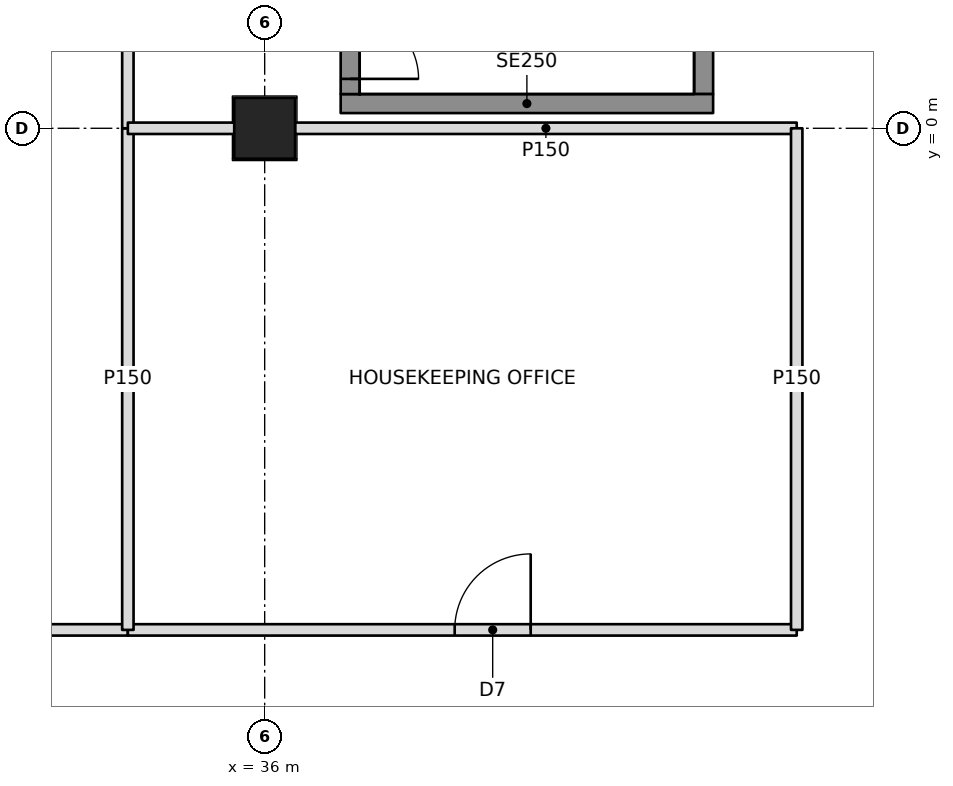
"""IFC4 building model, lengths in metres.
Left out: names, types, materials, properties, quantities, classifications, styles, units other than length and angle.
Written with IfcOpenShell. Run it as: python <this file> out.ifc"""

import sys

from ifc_helpers import new_model, si_unit, direction, frame, frame_2d, origin, origin_2d, place, context, subcontext, project, spatial, rectangle, hollow_rectangle, extrude, element, fill, save


model = new_model("IFC4")
c1 = context("Model", 3, precision=1e-05, world=origin(), true_north=direction((0.0, 1.0)))
c2 = subcontext(c1, "Body", "Model", "MODEL_VIEW")
j1 = project(units=[si_unit("LENGTHUNIT", "METRE"), si_unit("PLANEANGLEUNIT", "RADIAN")], contexts=[c1])
p1 = place(None, origin())
s1 = spatial("IfcSite", under=j1, at=p1, CompositionType="ELEMENT")
p2 = place(p1, origin())
s2 = spatial("IfcBuilding", under=s1, at=p2, CompositionType="ELEMENT")
p3 = place(p2, frame((0.0, 0.0, -10.5)))
s3 = spatial("IfcBuildingStorey", under=s2, at=p3, CompositionType="ELEMENT", Elevation=-10.5)
p4 = place(p3, frame((36.0, 0.0, -0.5), z_axis=(0.0, 0.0, 1.0), x_axis=(1.0, 0.0, 0.0)))
e1 = element("IfcColumn", 1, at=p4, inside=s3, PredefinedType="COLUMN", context=c2, shape_type="SweptSolid", body=[
    extrude(hollow_rectangle(XDim=0.8, YDim=0.8, WallThickness=0.1, at=origin_2d()), origin(), (0.0, 0.0, 1.0), 5.5),
])
p5 = place(p3, frame((34.2, -6.6, 0.0), z_axis=(0.0, 0.0, 1.0), x_axis=(-1.0, 0.0, 0.0)))
e2 = element("IfcWall", 2, at=p5, inside=s3, PredefinedType="PARTITIONING", context=c2, shape_type="SweptSolid", body=[
    extrude(rectangle(XDim=8.2, YDim=0.15, at=frame_2d((4.1, 0.0))), origin(), (0.0, 0.0, 1.0), 3.841),
])
p6 = place(p3, frame((43.0, -6.6, 0.0), z_axis=(0.0, 0.0, 1.0), x_axis=(-1.0, 0.0, 0.0)))
e3 = element("IfcWall", 3, at=p6, inside=s3, PredefinedType="PARTITIONING", context=c2, shape_type="SweptSolid", body=[
    extrude(rectangle(XDim=8.8, YDim=0.15, at=frame_2d((4.4, 0.0))), origin(), (0.0, 0.0, 1.0), 3.841),
])
p7 = place(p6, frame((3.5, 0.0, 0.0)))
e4 = element("IfcOpeningElement", 4, at=p7, cuts=e3, PredefinedType="OPENING", context=c2, shape_type="SweptSolid", body=[
    extrude(rectangle(XDim=1.0, YDim=2.1, at=frame_2d((0.5, 1.05))), frame((0.0, 0.085, 0.0), z_axis=(0.0, -1.0, 0.0), x_axis=(1.0, 0.0, 0.0)), (0.0, 0.0, 1.0), 0.17),
])
p8 = place(p3, frame((34.2, 0.0, 0.0), z_axis=(0.0, 0.0, 1.0), x_axis=(0.0, -1.0, 0.0)))
e5 = element("IfcWall", 5, at=p8, inside=s3, PredefinedType="PARTITIONING", context=c2, shape_type="SweptSolid", body=[
    extrude(rectangle(XDim=6.6, YDim=0.15, at=frame_2d((3.3, 0.0))), origin(), (0.0, 0.0, 1.0), 3.841),
])
p9 = place(p3, frame((34.2, 8.8, 0.0), z_axis=(0.0, 0.0, 1.0), x_axis=(0.0, -1.0, 0.0)))
e6 = element("IfcWall", 6, at=p9, inside=s3, PredefinedType="PARTITIONING", context=c2, shape_type="SweptSolid", body=[
    extrude(rectangle(XDim=8.8, YDim=0.15, at=frame_2d((4.4, 0.0))), origin(), (0.0, 0.0, 1.0), 3.841),
])
p10 = place(p9, frame((4.0, 0.0, 0.0)))
e7 = element("IfcOpeningElement", 7, at=p10, cuts=e6, PredefinedType="OPENING", context=c2, shape_type="SweptSolid", body=[
    extrude(rectangle(XDim=1.0, YDim=2.1, at=frame_2d((0.5, 1.05))), frame((0.0, 0.085, 0.0), z_axis=(0.0, -1.0, 0.0), x_axis=(1.0, 0.0, 0.0)), (0.0, 0.0, 1.0), 0.17),
])
p11 = place(p3, frame((34.2, 0.0, 0.0), z_axis=(0.0, 0.0, 1.0), x_axis=(1.0, 0.0, 0.0)))
e8 = element("IfcWall", 8, at=p11, inside=s3, PredefinedType="PARTITIONING", context=c2, shape_type="SweptSolid", body=[
    extrude(rectangle(XDim=1.4, YDim=0.15, at=frame_2d((0.7, 0.0))), origin(), (0.0, 0.0, 1.0), 3.842),
])
p12 = place(p3, frame((36.4, 0.0, 0.0), z_axis=(0.0, 0.0, 1.0), x_axis=(1.0, 0.0, 0.0)))
e9 = element("IfcWall", 9, at=p12, inside=s3, PredefinedType="PARTITIONING", context=c2, shape_type="SweptSolid", body=[
    extrude(rectangle(XDim=6.6, YDim=0.15, at=frame_2d((3.3, 0.0))), origin(), (0.0, 0.0, 1.0), 3.842),
])
p13 = place(p3, frame((43.0, 0.0, 0.0), z_axis=(0.0, 0.0, 1.0), x_axis=(0.0, -1.0, 0.0)))
e10 = element("IfcWall", 10, at=p13, inside=s3, PredefinedType="PARTITIONING", context=c2, shape_type="SweptSolid", body=[
    extrude(rectangle(XDim=6.6, YDim=0.15, at=frame_2d((3.3, 0.0))), origin(), (0.0, 0.0, 1.0), 3.841),
])
p14 = place(p3, frame((37.0, 0.325, 0.0), z_axis=(0.0, 0.0, 1.0), x_axis=(1.0, 0.0, 0.0)))
e11 = element("IfcWall", 11, at=p14, inside=s3, PredefinedType="SOLIDWALL", context=c2, shape_type="SweptSolid", body=[
    extrude(rectangle(XDim=4.9, YDim=0.25, at=frame_2d((2.45, 0.0))), origin(), (0.0, 0.0, 1.0), 4.7),
])
p15 = place(p3, frame((37.125, 0.45, 0.0), z_axis=(0.0, 0.0, 1.0), x_axis=(0.0, 1.0, 0.0)))
e12 = element("IfcWall", 12, at=p15, inside=s3, PredefinedType="SOLIDWALL", context=c2, shape_type="SweptSolid", body=[
    extrude(rectangle(XDim=8.1, YDim=0.25, at=frame_2d((4.05, 0.0))), origin(), (0.0, 0.0, 1.0), 4.7),
])
p16 = place(p15, frame((0.2, 0.0, 0.0)))
e13 = element("IfcOpeningElement", 13, at=p16, cuts=e12, PredefinedType="OPENING", context=c2, shape_type="SweptSolid", body=[
    extrude(rectangle(XDim=1.8, YDim=2.1, at=frame_2d((0.9, 1.05))), frame((0.0, 0.135, 0.0), z_axis=(0.0, -1.0, 0.0), x_axis=(1.0, 0.0, 0.0)), (0.0, 0.0, 1.0), 0.27),
])
p17 = place(p3, frame((41.775, 0.45, 0.0), z_axis=(0.0, 0.0, 1.0), x_axis=(0.0, 1.0, 0.0)))
e14 = element("IfcWall", 14, at=p17, inside=s3, PredefinedType="SOLIDWALL", context=c2, shape_type="SweptSolid", body=[
    extrude(rectangle(XDim=8.1, YDim=0.25, at=frame_2d((4.05, 0.0))), origin(), (0.0, 0.0, 1.0), 4.7),
])
p18 = place(p7, frame((1.0, 0.0, 0.0), z_axis=(0.0, 0.0, 1.0), x_axis=(-1.0, 0.0, 0.0)))
e15 = element("IfcDoor", 15, at=p18, inside=s3, OperationType="SINGLE_SWING_RIGHT", PredefinedType="DOOR", context=c2, shape_type="SweptSolid", body=[
    extrude(rectangle(XDim=1.0, YDim=2.1, at=frame_2d((0.5, 1.05))), frame((0.0, 0.025, 0.0), z_axis=(0.0, -1.0, 0.0), x_axis=(1.0, 0.0, 0.0)), (0.0, 0.0, 1.0), 0.05),
])
fill(e4, e15)
p19 = place(p16, frame((1.8, 0.0, 0.0), z_axis=(0.0, 0.0, 1.0), x_axis=(-1.0, 0.0, 0.0)))
e16 = element("IfcDoor", 16, at=p19, inside=s3, OperationType="DOUBLE_DOOR_SINGLE_SWING", PredefinedType="DOOR", context=c2, shape_type="SweptSolid", body=[
    extrude(rectangle(XDim=1.8, YDim=2.1, at=frame_2d((0.9, 1.05))), frame((0.0, 0.025, 0.0), z_axis=(0.0, -1.0, 0.0), x_axis=(1.0, 0.0, 0.0)), (0.0, 0.0, 1.0), 0.05),
])
fill(e13, e16)
save(model, sys.argv[1])
